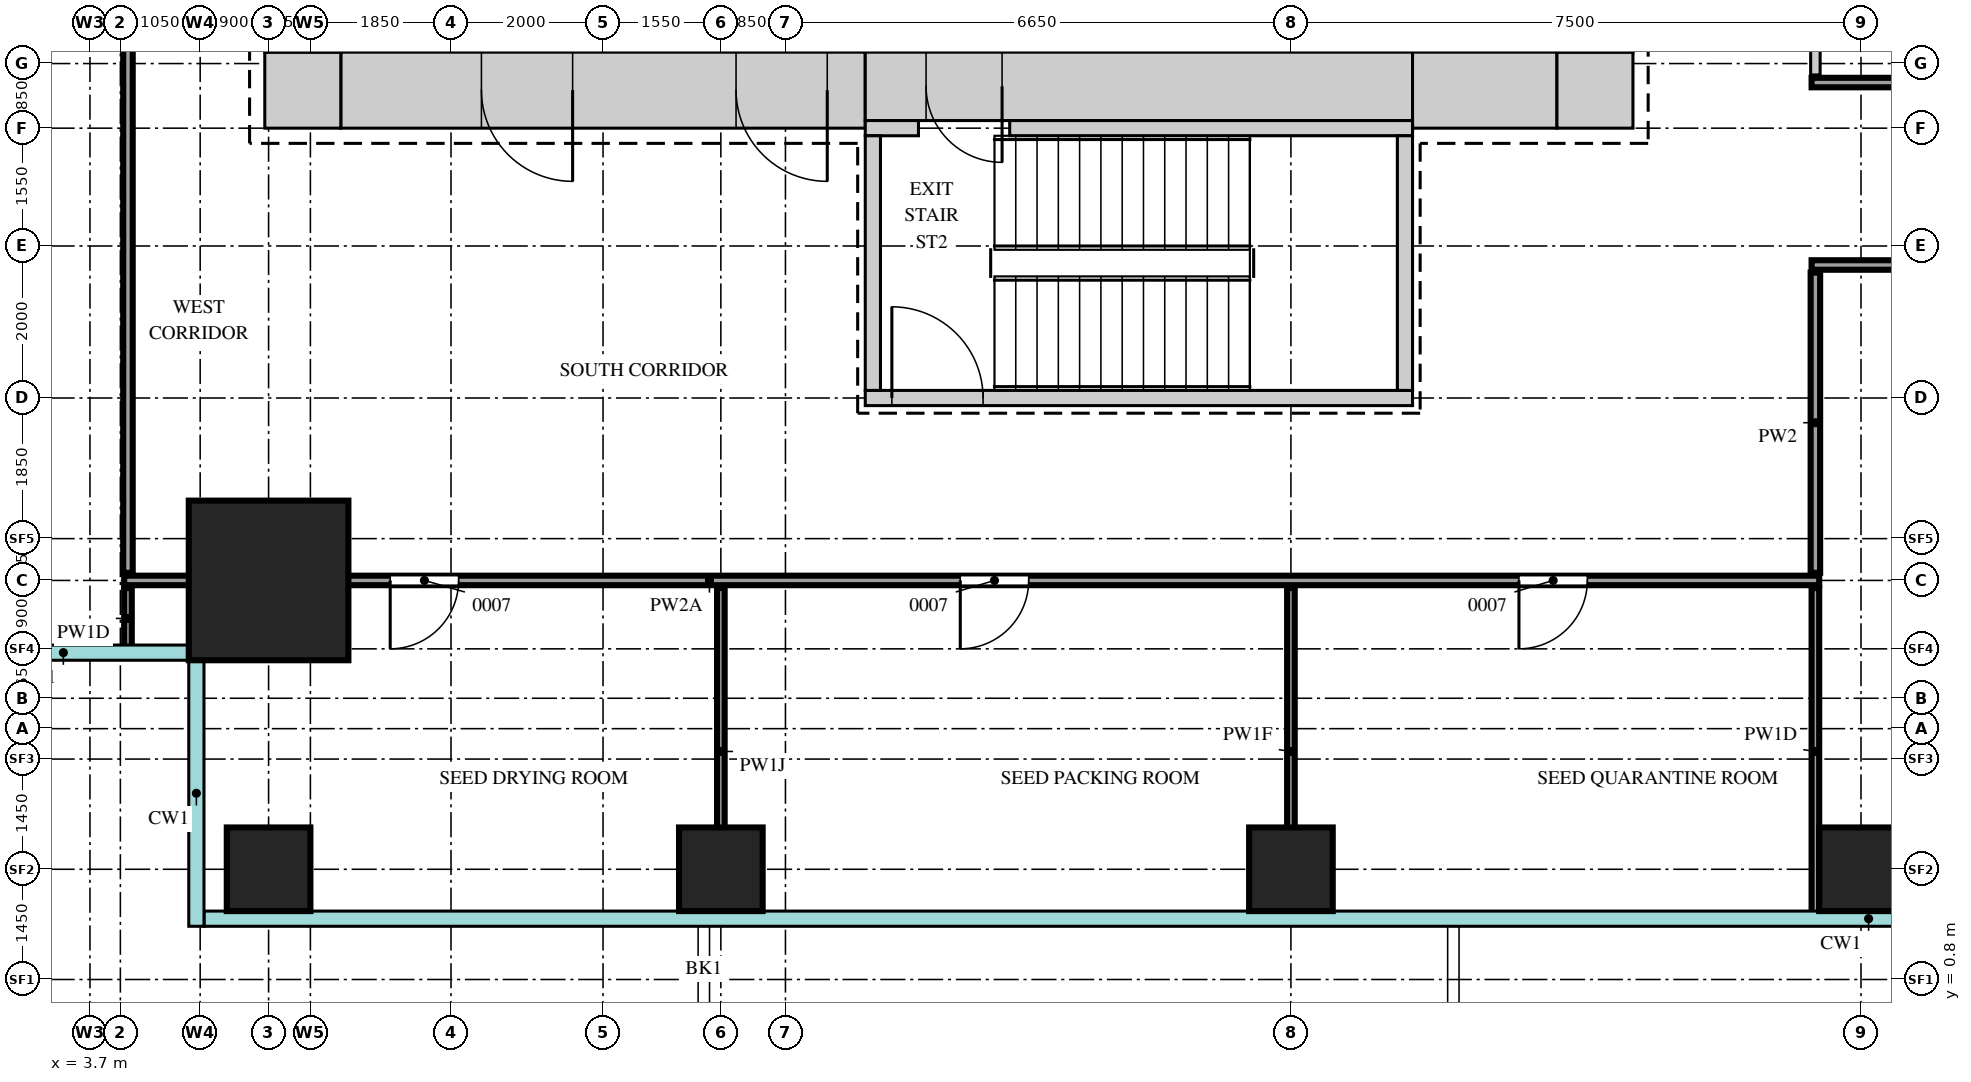
"""IFC4 building model, lengths in metres.
Left out: names, types, materials, properties, quantities, classifications, styles, units other than length and angle.
Written with IfcOpenShell. Run it as: python <this file> out.ifc"""

import sys

from ifc_helpers import new_model, si_unit, direction, frame, frame_2d, origin, origin_2d, place, context, subcontext, project, spatial, rectangle, extrude, source, transform, mapped, element, fill, save


model = new_model("IFC4")
c1 = context("Model", 3, precision=1e-05, world=origin(), true_north=direction((0.0, 1.0)))
c2 = subcontext(c1, "Body", "Model", "MODEL_VIEW")
j1 = project(units=[si_unit("LENGTHUNIT", "METRE"), si_unit("PLANEANGLEUNIT", "RADIAN")], contexts=[c1])
p1 = place(None, origin())
s1 = spatial("IfcSite", under=j1, at=p1, CompositionType="ELEMENT")
p2 = place(p1, origin())
s2 = spatial("IfcBuilding", under=s1, at=p2, CompositionType="ELEMENT")
p3 = place(p2, frame((0.0, 0.0, 105.9)))
s3 = spatial("IfcBuildingStorey", under=s2, at=p3, CompositionType="ELEMENT", Elevation=105.9)
m1 = source(origin(), c2, "Body", "SweptSolid", [
    extrude(rectangle(XDim=6.9, YDim=1.0, at=frame_2d((3.45, 0.0))), origin(), (0.0, 0.0, 1.0), 4.1),
])
p4 = place(p3, frame((7.0, 12.5, 0.0), z_axis=(0.0, 0.0, 1.0), x_axis=(1.0, 0.0, 0.0)))
e1 = element("IfcWall", 1, at=p4, inside=s3, PredefinedType="SHEAR", context=c2, shape_type="MappedRepresentation", body=[
    mapped(m1, transform((0.0, 0.0, 0.0))),
])
m2 = source(origin(), c2, "Body", "SweptSolid", [
    extrude(rectangle(XDim=1.2, YDim=2.1, at=frame_2d((0.6, 1.05))), frame((0.0, 0.51, 0.0), z_axis=(0.0, -1.0, 0.0), x_axis=(1.0, 0.0, 0.0)), (0.0, 0.0, 1.0), 1.02),
])
p5 = place(p4, frame((5.2, 0.0, 0.0)))
e2 = element("IfcOpeningElement", 2, at=p5, cuts=e1, PredefinedType="OPENING", context=c2, shape_type="MappedRepresentation", body=[
    mapped(m2, transform((0.0, 0.0, 0.0))),
])
p6 = place(p4, frame((1.85, 0.0, 0.0)))
e3 = element("IfcOpeningElement", 3, at=p6, cuts=e1, PredefinedType="OPENING", context=c2, shape_type="MappedRepresentation", body=[
    mapped(m2, transform((0.0, 0.0, 0.0))),
])
m3 = source(origin(), c2, "Body", "SweptSolid", [
    extrude(rectangle(XDim=7.2, YDim=0.9, at=frame_2d((3.6, 0.0))), origin(), (0.0, 0.0, 1.0), 4.1),
])
p7 = place(p3, frame((13.9, 12.55, 0.0), z_axis=(0.0, 0.0, 1.0), x_axis=(1.0, 0.0, 0.0)))
e4 = element("IfcWall", 4, at=p7, inside=s3, PredefinedType="SHEAR", context=c2, shape_type="MappedRepresentation", body=[
    mapped(m3, transform((0.0, 0.0, 0.0))),
])
m4 = source(origin(), c2, "Body", "SweptSolid", [
    extrude(rectangle(XDim=1.0, YDim=2.1, at=frame_2d((0.5, 1.05))), frame((0.0, 0.46, 0.0), z_axis=(0.0, -1.0, 0.0), x_axis=(1.0, 0.0, 0.0)), (0.0, 0.0, 1.0), 0.92),
])
p8 = place(p7, frame((0.8, 0.0, 0.0)))
e5 = element("IfcOpeningElement", 5, at=p8, cuts=e4, PredefinedType="OPENING", context=c2, shape_type="MappedRepresentation", body=[
    mapped(m4, transform((0.0, 0.0, 0.0))),
])
m5 = source(origin(), c2, "Body", "SweptSolid", [
    extrude(rectangle(XDim=1.9, YDim=1.0, at=frame_2d((0.95, 0.0))), origin(), (0.0, 0.0, 1.0), 4.1),
])
p9 = place(p3, frame((21.1, 12.5, 0.0), z_axis=(0.0, 0.0, 1.0), x_axis=(1.0, 0.0, 0.0)))
e6 = element("IfcWall", 6, at=p9, inside=s3, PredefinedType="SHEAR", context=c2, shape_type="MappedRepresentation", body=[
    mapped(m5, transform((0.0, 0.0, 0.0))),
])
m6 = source(origin(), c2, "Body", "SweptSolid", [
    extrude(rectangle(XDim=1.0, YDim=1.0, at=frame_2d((0.5, 0.0))), origin(), (0.0, 0.0, 1.0), 4.1),
])
for number, where, z_axis, x_axis in (
    (7, (23.0, 12.5, 0.0), (0.0, 0.0, 1.0), (1.0, 0.0, 0.0)),
    (8, (6.0, 12.5, 0.0), (0.0, 0.0, 1.0), (1.0, 0.0, 0.0)),
):
    element("IfcWall", number, at=place(p3, frame(where, z_axis=z_axis, x_axis=x_axis)), inside=s3, PredefinedType="SHEAR", context=c2, shape_type="MappedRepresentation", body=[
        mapped(m6, transform((0.0, 0.0, 0.0))),
    ])
m7 = source(origin(), c2, "Body", "SweptSolid", [
    extrude(rectangle(XDim=0.7, YDim=0.2, at=frame_2d((0.35, 0.0))), origin(), (0.0, 0.0, 1.0), 4.1),
])
p10 = place(p3, frame((13.9, 12.0, 0.0), z_axis=(0.0, 0.0, 1.0), x_axis=(1.0, 0.0, 0.0)))
e9 = element("IfcWall", 9, at=p10, inside=s3, PredefinedType="SHEAR", context=c2, shape_type="MappedRepresentation", body=[
    mapped(m7, transform((0.0, 0.0, 0.0))),
])
m8 = source(origin(), c2, "Body", "SweptSolid", [
    extrude(rectangle(XDim=5.3, YDim=0.2, at=frame_2d((2.65, 0.0))), origin(), (0.0, 0.0, 1.0), 4.1),
])
p11 = place(p3, frame((15.8, 12.0, 0.0), z_axis=(0.0, 0.0, 1.0), x_axis=(1.0, 0.0, 0.0)))
e10 = element("IfcWall", 10, at=p11, inside=s3, PredefinedType="SHEAR", context=c2, shape_type="MappedRepresentation", body=[
    mapped(m8, transform((0.0, 0.0, 0.0))),
])
m9 = source(origin(), c2, "Body", "SweptSolid", [
    extrude(rectangle(XDim=7.2, YDim=0.2, at=frame_2d((3.6, 0.0))), origin(), (0.0, 0.0, 1.0), 4.1),
])
p12 = place(p3, frame((13.9, 8.45, 0.0), z_axis=(0.0, 0.0, 1.0), x_axis=(1.0, 0.0, 0.0)))
e11 = element("IfcWall", 11, at=p12, inside=s3, PredefinedType="SHEAR", context=c2, shape_type="MappedRepresentation", body=[
    mapped(m9, transform((0.0, 0.0, 0.0))),
])
m10 = source(origin(), c2, "Body", "SweptSolid", [
    extrude(rectangle(XDim=1.2, YDim=2.1, at=frame_2d((0.6, 1.05))), frame((0.0, 0.11, 0.0), z_axis=(0.0, -1.0, 0.0), x_axis=(1.0, 0.0, 0.0)), (0.0, 0.0, 1.0), 0.22),
])
p13 = place(p12, frame((0.35, 0.0, 0.0)))
e12 = element("IfcOpeningElement", 12, at=p13, cuts=e11, PredefinedType="OPENING", context=c2, shape_type="MappedRepresentation", body=[
    mapped(m10, transform((0.0, 0.0, 0.0))),
])
m11 = source(origin(), c2, "Body", "SweptSolid", [
    extrude(rectangle(XDim=3.35, YDim=0.2, at=frame_2d((1.675, 0.0))), origin(), (0.0, 0.0, 1.0), 4.1),
])
for number, where, z_axis, x_axis in (
    (13, (21.0, 8.55, 0.0), (0.0, 0.0, 1.0), (0.0, 1.0, 0.0)),
    (14, (14.0, 8.55, 0.0), (0.0, 0.0, 1.0), (0.0, 1.0, 0.0)),
):
    element("IfcWall", number, at=place(p3, frame(where, z_axis=z_axis, x_axis=x_axis)), inside=s3, PredefinedType="SHEAR", context=c2, shape_type="MappedRepresentation", body=[
        mapped(m11, transform((0.0, 0.0, 0.0))),
    ])
m12 = source(origin(), c2, "Body", "SweptSolid", [
    extrude(rectangle(XDim=2.1, YDim=2.1, at=origin_2d()), origin(), (0.0, 0.0, 1.0), 4.4),
])
p14 = place(p3, frame((6.05, 6.05, 0.0), z_axis=(0.0, 0.0, 1.0), x_axis=(1.0, 0.0, 0.0)))
e15 = element("IfcColumn", 15, at=p14, inside=s3, PredefinedType="COLUMN", context=c2, shape_type="MappedRepresentation", body=[
    mapped(m12, transform((0.0, 0.0, 0.0))),
])
m13 = source(origin(), c2, "Body", "SweptSolid", [
    extrude(rectangle(XDim=1.1, YDim=1.1, at=origin_2d()), origin(), (0.0, 0.0, 1.0), 4.1),
])
for number, where, z_axis, x_axis in (
    (16, (6.05, 2.25, 0.0), (0.0, 0.0, 1.0), (1.0, 0.0, 0.0)),
    (17, (12.0, 2.25, 0.0), (0.0, 0.0, 1.0), (1.0, 0.0, 0.0)),
    (18, (19.5, 2.25, 0.0), (0.0, 0.0, 1.0), (1.0, 0.0, 0.0)),
    (19, (27.0, 2.25, 0.0), (0.0, 0.0, 1.0), (1.0, 0.0, 0.0)),
):
    element("IfcColumn", number, at=place(p3, frame(where, z_axis=z_axis, x_axis=x_axis)), inside=s3, PredefinedType="COLUMN", context=c2, shape_type="MappedRepresentation", body=[
        mapped(m13, transform((0.0, 0.0, 0.0))),
    ])
m14 = source(origin(), c2, "Body", "SweptSolid", [
    extrude(rectangle(XDim=4.3, YDim=0.1, at=frame_2d((2.15, 0.0))), origin(), (0.0, 0.0, 1.0), 3.65),
])
p15 = place(p3, frame((12.0, 1.65, 0.0), z_axis=(0.0, 0.0, 1.0), x_axis=(0.0, 1.0, 0.0)))
e20 = element("IfcWall", 20, at=p15, inside=s3, PredefinedType="PARTITIONING", context=c2, shape_type="MappedRepresentation", body=[
    mapped(m14, transform((0.0, 0.0, 0.0))),
])
m15 = source(origin(), c2, "Body", "SweptSolid", [
    extrude(rectangle(XDim=4.3, YDim=0.1, at=frame_2d((2.15, 0.0))), origin(), (0.0, 0.0, 1.0), 3.77),
])
p16 = place(p3, frame((19.5, 1.65, 0.0), z_axis=(0.0, 0.0, 1.0), x_axis=(0.0, 1.0, 0.0)))
e21 = element("IfcWall", 21, at=p16, inside=s3, PredefinedType="PARTITIONING", context=c2, shape_type="MappedRepresentation", body=[
    mapped(m15, transform((0.0, 0.0, 0.0))),
])
m16 = source(origin(), c2, "Body", "SweptSolid", [
    extrude(rectangle(XDim=4.3, YDim=0.1, at=frame_2d((2.15, 0.0))), origin(), (0.0, 0.0, 1.0), 4.2),
])
p17 = place(p3, frame((26.4, 1.65, 0.0), z_axis=(0.0, 0.0, 1.0), x_axis=(0.0, 1.0, 0.0)))
e22 = element("IfcWall", 22, at=p17, inside=s3, PredefinedType="PARTITIONING", context=c2, shape_type="MappedRepresentation", body=[
    mapped(m16, transform((0.0, 0.0, 0.0))),
])
m17 = source(origin(), c2, "Body", "SweptSolid", [
    extrude(rectangle(XDim=0.8, YDim=0.1, at=frame_2d((0.4, 0.0))), origin(), (0.0, 0.0, 1.0), 4.2),
])
p18 = place(p3, frame((4.2, 5.15, 0.0), z_axis=(0.0, 0.0, 1.0), x_axis=(0.0, 1.0, 0.0)))
e23 = element("IfcWall", 23, at=p18, inside=s3, PredefinedType="PARTITIONING", context=c2, shape_type="MappedRepresentation", body=[
    mapped(m17, transform((0.0, 0.0, 0.0))),
])
m18 = source(origin(), c2, "Body", "SweptSolid", [
    extrude(rectangle(XDim=22.3, YDim=0.125, at=frame_2d((11.15, 0.0))), origin(), (0.0, 0.0, 1.0), 3.55),
])
p19 = place(p3, frame((4.15, 6.05, 0.0), z_axis=(0.0, 0.0, 1.0), x_axis=(1.0, 0.0, 0.0)))
e24 = element("IfcWall", 24, at=p19, inside=s3, PredefinedType="PARTITIONING", context=c2, shape_type="MappedRepresentation", body=[
    mapped(m18, transform((0.0, 0.0, 0.0))),
])
m19 = source(origin(), c2, "Body", "SweptSolid", [
    extrude(rectangle(XDim=0.9, YDim=2.1, at=frame_2d((0.45, 1.05))), frame((0.0, 0.073, 0.0), z_axis=(0.0, -1.0, 0.0), x_axis=(1.0, 0.0, 0.0)), (0.0, 0.0, 1.0), 0.145),
])
p20 = place(p19, frame((3.5, 0.0, 0.0)))
e25 = element("IfcOpeningElement", 25, at=p20, cuts=e24, PredefinedType="OPENING", context=c2, shape_type="MappedRepresentation", body=[
    mapped(m19, transform((0.0, 0.0, 0.0))),
])
p21 = place(p19, frame((11.0, 0.0, 0.0)))
e26 = element("IfcOpeningElement", 26, at=p21, cuts=e24, PredefinedType="OPENING", context=c2, shape_type="MappedRepresentation", body=[
    mapped(m19, transform((0.0, 0.0, 0.0))),
])
p22 = place(p19, frame((18.35, 0.0, 0.0)))
e27 = element("IfcOpeningElement", 27, at=p22, cuts=e24, PredefinedType="OPENING", context=c2, shape_type="MappedRepresentation", body=[
    mapped(m19, transform((0.0, 0.0, 0.0))),
])
m20 = source(origin(), c2, "Body", "SweptSolid", [
    extrude(rectangle(XDim=41.8, YDim=0.125, at=frame_2d((20.9, 0.0))), origin(), (0.0, 0.0, 1.0), 4.2),
])
p23 = place(p3, frame((4.2, 6.15, 0.0), z_axis=(0.0, 0.0, 1.0), x_axis=(0.0, 1.0, 0.0)))
e28 = element("IfcWall", 28, at=p23, inside=s3, PredefinedType="PARTITIONING", context=c2, shape_type="MappedRepresentation", body=[
    mapped(m20, transform((0.0, 0.0, 0.0))),
])
p24 = place(p23, frame((7.2, 0.0, 0.0)))
e29 = element("IfcOpeningElement", 29, at=p24, cuts=e28, PredefinedType="OPENING", context=c2, shape_type="MappedRepresentation", body=[
    mapped(m19, transform((0.0, 0.0, 0.0))),
])
p25 = place(p23, frame((21.8, 0.0, 0.0)))
e30 = element("IfcOpeningElement", 30, at=p25, cuts=e28, PredefinedType="OPENING", context=c2, shape_type="MappedRepresentation", body=[
    mapped(m19, transform((0.0, 0.0, 0.0))),
])
p26 = place(p23, frame((33.3, 0.0, 0.0)))
e31 = element("IfcOpeningElement", 31, at=p26, cuts=e28, PredefinedType="OPENING", context=c2, shape_type="MappedRepresentation", body=[
    mapped(m19, transform((0.0, 0.0, 0.0))),
])
m21 = source(origin(), c2, "Body", "SweptSolid", [
    extrude(rectangle(XDim=3.95, YDim=0.125, at=frame_2d((1.975, 0.0))), origin(), (0.0, 0.0, 1.0), 4.2),
])
p27 = place(p3, frame((26.4, 6.15, 0.0), z_axis=(0.0, 0.0, 1.0), x_axis=(0.0, 1.0, 0.0)))
e32 = element("IfcWall", 32, at=p27, inside=s3, PredefinedType="PARTITIONING", context=c2, shape_type="MappedRepresentation", body=[
    mapped(m21, transform((0.0, 0.0, 0.0))),
])
m22 = source(origin(), c2, "Body", "SweptSolid", [
    extrude(rectangle(XDim=20.0, YDim=0.125, at=frame_2d((10.0, 0.0))), origin(), (0.0, 0.0, 1.0), 4.2),
])
p28 = place(p3, frame((26.35, 10.2, 0.0), z_axis=(0.0, 0.0, 1.0), x_axis=(1.0, 0.0, 0.0)))
e33 = element("IfcWall", 33, at=p28, inside=s3, PredefinedType="PARTITIONING", context=c2, shape_type="MappedRepresentation", body=[
    mapped(m22, transform((0.0, 0.0, 0.0))),
])
p29 = place(p28, frame((3.8, 0.0, 0.0)))
e34 = element("IfcOpeningElement", 34, at=p29, cuts=e33, PredefinedType="OPENING", context=c2, shape_type="MappedRepresentation", body=[
    mapped(m19, transform((0.0, 0.0, 0.0))),
])
p30 = place(p28, frame((11.3, 0.0, 0.0)))
e35 = element("IfcOpeningElement", 35, at=p30, cuts=e33, PredefinedType="OPENING", context=c2, shape_type="MappedRepresentation", body=[
    mapped(m19, transform((0.0, 0.0, 0.0))),
])
m23 = source(origin(), c2, "Body", "SweptSolid", [
    extrude(rectangle(XDim=1.2, YDim=2.1, at=frame_2d((0.6, 1.05))), frame((0.0, 0.073, 0.0), z_axis=(0.0, -1.0, 0.0), x_axis=(1.0, 0.0, 0.0)), (0.0, 0.0, 1.0), 0.145),
])
p31 = place(p28, frame((18.4, 0.0, 0.0)))
e36 = element("IfcOpeningElement", 36, at=p31, cuts=e33, PredefinedType="OPENING", context=c2, shape_type="MappedRepresentation", body=[
    mapped(m23, transform((0.0, 0.0, 0.0))),
])
m24 = source(origin(), c2, "Body", "SweptSolid", [
    extrude(rectangle(XDim=17.7, YDim=0.125, at=frame_2d((8.85, 0.0))), origin(), (0.0, 0.0, 1.0), 4.2),
])
p32 = place(p3, frame((26.35, 12.6, 0.0), z_axis=(0.0, 0.0, 1.0), x_axis=(1.0, 0.0, 0.0)))
e37 = element("IfcWall", 37, at=p32, inside=s3, PredefinedType="PARTITIONING", context=c2, shape_type="MappedRepresentation", body=[
    mapped(m24, transform((0.0, 0.0, 0.0))),
])
m25 = source(origin(), c2, "Body", "SweptSolid", [
    extrude(rectangle(XDim=23.2, YDim=0.125, at=frame_2d((11.6, 0.0))), origin(), (0.0, 0.0, 1.0), 4.2),
])
p33 = place(p3, frame((26.4, 12.7, 0.0), z_axis=(0.0, 0.0, 1.0), x_axis=(0.0, 1.0, 0.0)))
e38 = element("IfcWall", 38, at=p33, inside=s3, PredefinedType="PARTITIONING", context=c2, shape_type="MappedRepresentation", body=[
    mapped(m25, transform((0.0, 0.0, 0.0))),
])
p34 = place(p33, frame((2.15, 0.0, 0.0)))
e39 = element("IfcOpeningElement", 39, at=p34, cuts=e38, PredefinedType="OPENING", context=c2, shape_type="MappedRepresentation", body=[
    mapped(m19, transform((0.0, 0.0, 0.0))),
])
p35 = place(p33, frame((18.2, 0.0, 0.0)))
e40 = element("IfcOpeningElement", 40, at=p35, cuts=e38, PredefinedType="OPENING", context=c2, shape_type="MappedRepresentation", body=[
    mapped(m23, transform((0.0, 0.0, 0.0))),
])
m26 = source(origin(), c2, "Body", "SweptSolid", [
    extrude(rectangle(XDim=1.2, YDim=2.1, at=frame_2d((0.6, 1.05))), frame((0.0, 0.45, 0.0), z_axis=(0.0, -1.0, 0.0), x_axis=(1.0, 0.0, 0.0)), (0.0, 0.0, 1.0), 0.9),
])
p36 = place(p5, origin())
e41 = element("IfcDoor", 41, at=p36, inside=s3, OperationType="SINGLE_SWING_RIGHT", PredefinedType="DOOR", context=c2, shape_type="MappedRepresentation", body=[
    mapped(m26, transform((0.0, 0.0, 0.0))),
])
fill(e2, e41)
p37 = place(p6, origin())
e42 = element("IfcDoor", 42, at=p37, inside=s3, OperationType="SINGLE_SWING_RIGHT", PredefinedType="DOOR", context=c2, shape_type="MappedRepresentation", body=[
    mapped(m26, transform((0.0, 0.0, 0.0))),
])
fill(e3, e42)
m27 = source(origin(), c2, "Body", "SweptSolid", [
    extrude(rectangle(XDim=1.0, YDim=2.1, at=frame_2d((0.5, 1.05))), frame((0.0, 0.4, 0.0), z_axis=(0.0, -1.0, 0.0), x_axis=(1.0, 0.0, 0.0)), (0.0, 0.0, 1.0), 0.8),
])
p38 = place(p8, origin())
e43 = element("IfcDoor", 43, at=p38, inside=s3, OperationType="SINGLE_SWING_RIGHT", PredefinedType="DOOR", context=c2, shape_type="MappedRepresentation", body=[
    mapped(m27, transform((0.0, 0.0, 0.0))),
])
fill(e5, e43)
m28 = source(origin(), c2, "Body", "SweptSolid", [
    extrude(rectangle(XDim=0.9, YDim=2.1, at=frame_2d((0.45, 1.05))), frame((0.0, 0.025, 0.0), z_axis=(0.0, -1.0, 0.0), x_axis=(1.0, 0.0, 0.0)), (0.0, 0.0, 1.0), 0.05),
])
p39 = place(p20, origin())
e44 = element("IfcDoor", 44, at=p39, inside=s3, OperationType="SINGLE_SWING_LEFT", PredefinedType="DOOR", context=c2, shape_type="MappedRepresentation", body=[
    mapped(m28, transform((0.0, 0.0, 0.0))),
])
fill(e25, e44)
p40 = place(p21, origin())
e45 = element("IfcDoor", 45, at=p40, inside=s3, OperationType="SINGLE_SWING_LEFT", PredefinedType="DOOR", context=c2, shape_type="MappedRepresentation", body=[
    mapped(m28, transform((0.0, 0.0, 0.0))),
])
fill(e26, e45)
p41 = place(p22, origin())
e46 = element("IfcDoor", 46, at=p41, inside=s3, OperationType="SINGLE_SWING_LEFT", PredefinedType="DOOR", context=c2, shape_type="MappedRepresentation", body=[
    mapped(m28, transform((0.0, 0.0, 0.0))),
])
fill(e27, e46)
m29 = source(origin(), c2, "Body", "SweptSolid", [
    extrude(rectangle(XDim=1.2, YDim=2.1, at=frame_2d((0.6, 1.05))), frame((0.0, 0.025, 0.0), z_axis=(0.0, -1.0, 0.0), x_axis=(1.0, 0.0, 0.0)), (0.0, 0.0, 1.0), 0.05),
])
p42 = place(p13, origin())
e47 = element("IfcDoor", 47, at=p42, inside=s3, OperationType="SINGLE_SWING_RIGHT", PredefinedType="DOOR", context=c2, shape_type="MappedRepresentation", body=[
    mapped(m29, transform((0.0, 0.0, 0.0))),
])
fill(e12, e47)
save(model, sys.argv[1])
